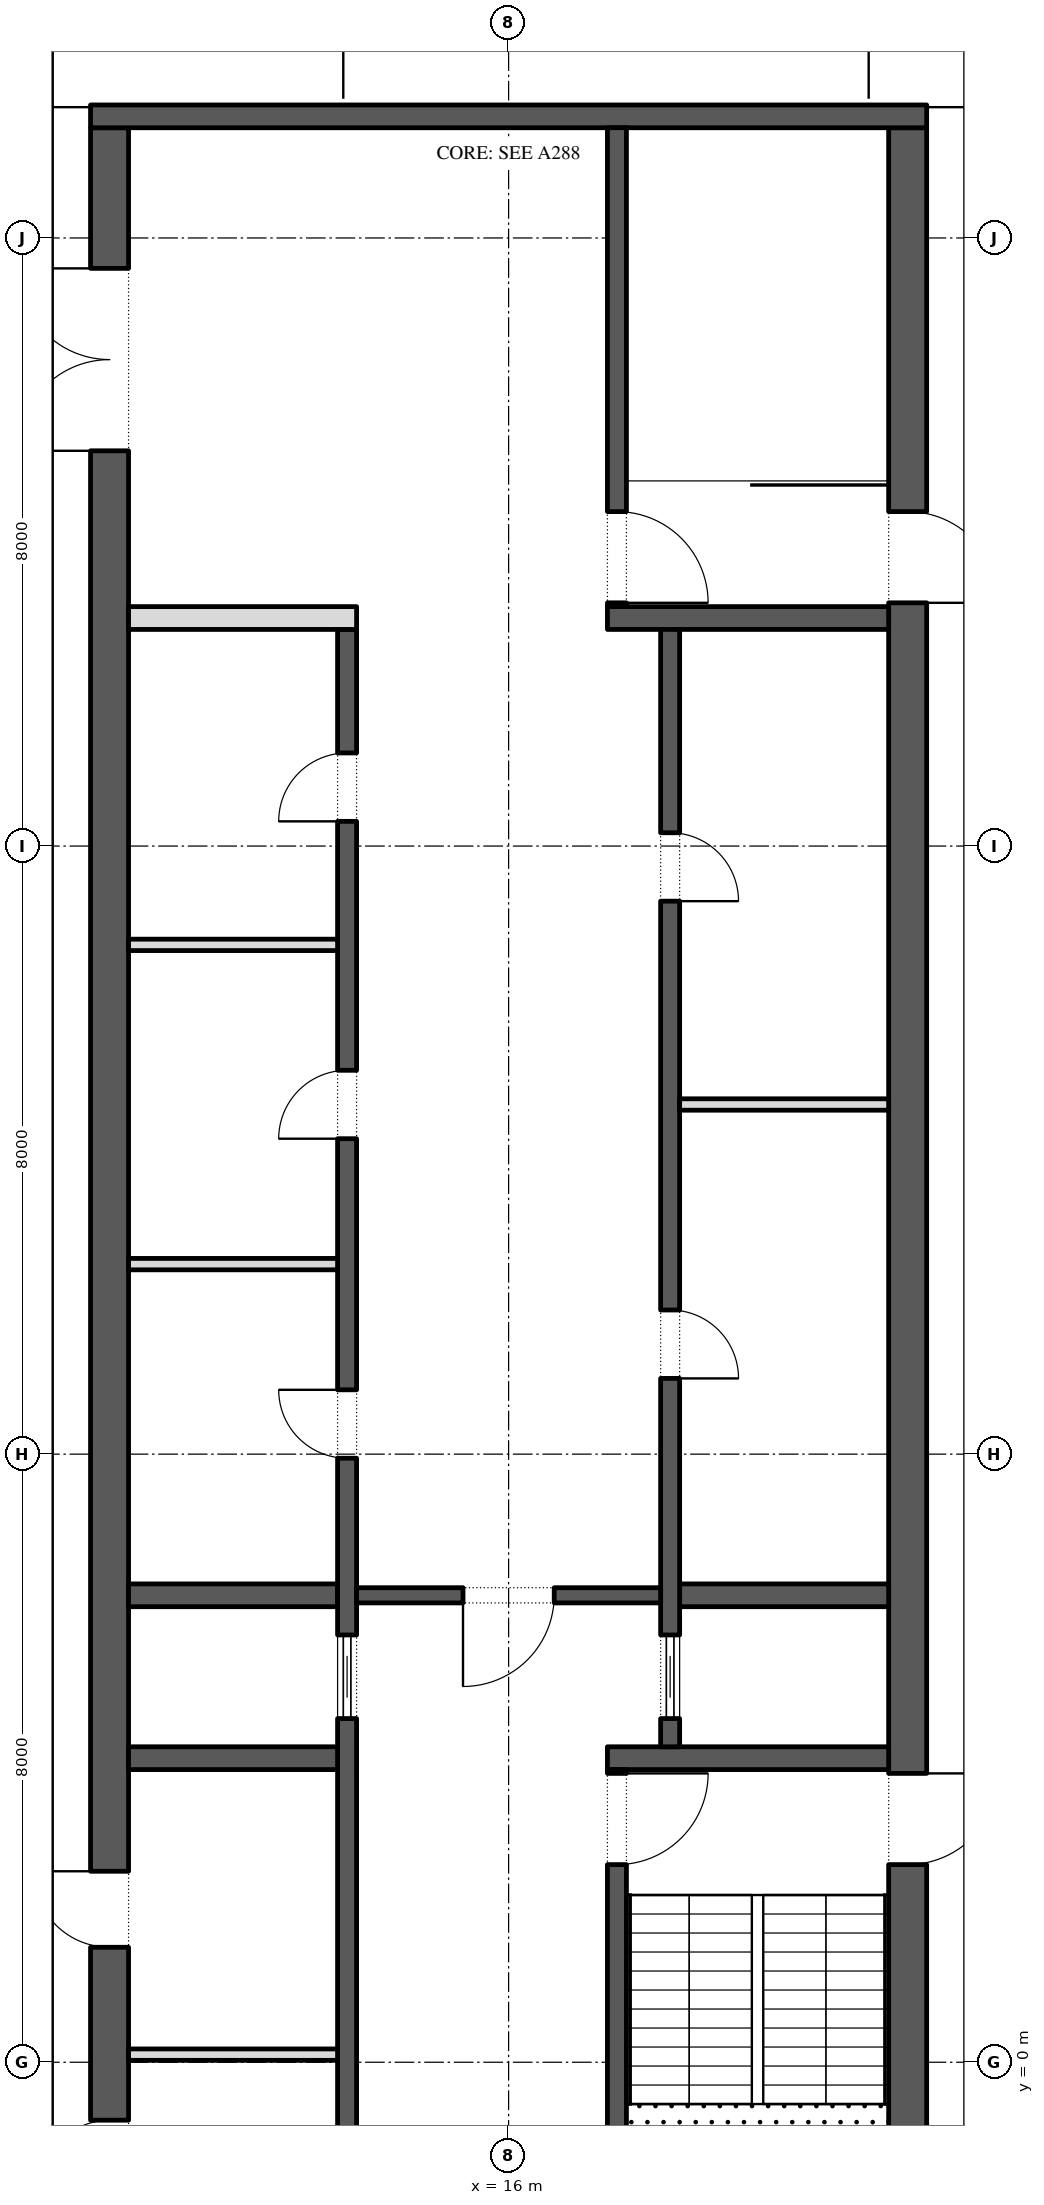
"""IFC4 building model, lengths in metres.
Left out: names, types, materials, properties, quantities, classifications, styles, units other than length and angle.
Written with IfcOpenShell. Run it as: python <this file> out.ifc"""

import sys

from ifc_helpers import new_model, si_unit, direction, frame, frame_2d, origin, place, context, subcontext, project, spatial, rectangle, extrude, element, fill, save


model = new_model("IFC4")
c1 = context("Model", 3, precision=1e-05, world=origin(), true_north=direction((0.0, 1.0)))
c2 = subcontext(c1, "Body", "Model", "MODEL_VIEW")
j1 = project(units=[si_unit("LENGTHUNIT", "METRE"), si_unit("PLANEANGLEUNIT", "RADIAN")], contexts=[c1])
p1 = place(None, origin())
s1 = spatial("IfcSite", under=j1, at=p1, CompositionType="ELEMENT")
p2 = place(p1, origin())
s2 = spatial("IfcBuilding", under=s1, at=p2, CompositionType="ELEMENT")
p3 = place(p2, frame((0.0, 0.0, 385.8)))
s3 = spatial("IfcBuildingStorey", under=s2, at=p3, CompositionType="ELEMENT", Elevation=385.8)
p4 = place(p3, frame((21.25, -2.45, 0.0), z_axis=(0.0, 0.0, 1.0), x_axis=(0.0, 1.0, 0.0)))
e1 = element("IfcWall", 1, at=p4, inside=s3, PredefinedType="SHEAR", context=c2, shape_type="SweptSolid", body=[
    extrude(rectangle(XDim=27.9, YDim=0.5, at=frame_2d((13.95, 0.0))), origin(), (0.0, 0.0, 1.0), 4.0),
])
p5 = place(p4, frame((5.05, 0.0, 0.0)))
e2 = element("IfcOpeningElement", 2, at=p5, cuts=e1, PredefinedType="OPENING", context=c2, shape_type="SweptSolid", body=[
    extrude(rectangle(XDim=1.2, YDim=2.1, at=frame_2d((0.6, 1.05))), frame((0.0, 0.26, 0.0), z_axis=(0.0, -1.0, 0.0), x_axis=(1.0, 0.0, 0.0)), (0.0, 0.0, 1.0), 0.52),
])
p6 = place(p4, frame((21.65, 0.0, 0.0)))
e3 = element("IfcOpeningElement", 3, at=p6, cuts=e1, PredefinedType="OPENING", context=c2, shape_type="SweptSolid", body=[
    extrude(rectangle(XDim=1.2, YDim=2.1, at=frame_2d((0.6, 1.05))), frame((0.0, 0.26, 0.0), z_axis=(0.0, -1.0, 0.0), x_axis=(1.0, 0.0, 0.0)), (0.0, 0.0, 1.0), 0.52),
])
p7 = place(p3, frame((10.75, -2.45, 0.0), z_axis=(0.0, 0.0, 1.0), x_axis=(0.0, 1.0, 0.0)))
e4 = element("IfcWall", 4, at=p7, inside=s3, PredefinedType="SHEAR", context=c2, shape_type="SweptSolid", body=[
    extrude(rectangle(XDim=27.9, YDim=0.5, at=frame_2d((13.95, 0.0))), origin(), (0.0, 0.0, 1.0), 4.0),
])
p8 = place(p7, frame((23.65, 0.0, 0.0)))
e5 = element("IfcOpeningElement", 5, at=p8, cuts=e4, PredefinedType="OPENING", context=c2, shape_type="SweptSolid", body=[
    extrude(rectangle(XDim=2.4, YDim=2.1, at=frame_2d((1.2, 1.05))), frame((0.0, 0.26, 0.0), z_axis=(0.0, -1.0, 0.0), x_axis=(1.0, 0.0, 0.0)), (0.0, 0.0, 1.0), 0.52),
])
p9 = place(p7, frame((0.788, 0.0, 0.0)))
e6 = element("IfcOpeningElement", 6, at=p9, cuts=e4, PredefinedType="OPENING", context=c2, shape_type="SweptSolid", body=[
    extrude(rectangle(XDim=0.9, YDim=2.1, at=frame_2d((0.45, 1.05))), frame((0.0, 0.26, 0.0), z_axis=(0.0, -1.0, 0.0), x_axis=(1.0, 0.0, 0.0)), (0.0, 0.0, 1.0), 0.52),
])
p10 = place(p7, frame((3.962, 0.0, 0.0)))
e7 = element("IfcOpeningElement", 7, at=p10, cuts=e4, PredefinedType="OPENING", context=c2, shape_type="SweptSolid", body=[
    extrude(rectangle(XDim=1.0, YDim=2.1, at=frame_2d((0.5, 1.05))), frame((0.0, 0.26, 0.0), z_axis=(0.0, -1.0, 0.0), x_axis=(1.0, 0.0, 0.0)), (0.0, 0.0, 1.0), 0.52),
])
p11 = place(p3, frame((10.5, 25.6, 0.0), z_axis=(0.0, 0.0, 1.0), x_axis=(1.0, 0.0, 0.0)))
e8 = element("IfcWall", 8, at=p11, inside=s3, PredefinedType="SHEAR", context=c2, shape_type="SweptSolid", body=[
    extrude(rectangle(XDim=11.0, YDim=0.3, at=frame_2d((5.5, 0.0))), origin(), (0.0, 0.0, 1.0), 4.0),
])
p12 = place(p3, frame((17.3, 4.0, 0.0), z_axis=(0.0, 0.0, 1.0), x_axis=(1.0, 0.0, 0.0)))
e9 = element("IfcWall", 9, at=p12, inside=s3, PredefinedType="SHEAR", context=c2, shape_type="SweptSolid", body=[
    extrude(rectangle(XDim=3.7, YDim=0.3, at=frame_2d((1.85, 0.0))), origin(), (0.0, 0.0, 1.0), 4.0),
])
p13 = place(p3, frame((17.425, -2.45, 0.0), z_axis=(0.0, 0.0, 1.0), x_axis=(0.0, 1.0, 0.0)))
e10 = element("IfcWall", 10, at=p13, inside=s3, PredefinedType="SHEAR", context=c2, shape_type="SweptSolid", body=[
    extrude(rectangle(XDim=6.3, YDim=0.25, at=frame_2d((3.15, 0.0))), origin(), (0.0, 0.0, 1.0), 4.0),
])
p14 = place(p13, frame((5.05, 0.0, 0.0)))
e11 = element("IfcOpeningElement", 11, at=p14, cuts=e10, PredefinedType="OPENING", context=c2, shape_type="SweptSolid", body=[
    extrude(rectangle(XDim=1.2, YDim=2.1, at=frame_2d((0.6, 1.05))), frame((0.0, 0.135, 0.0), z_axis=(0.0, -1.0, 0.0), x_axis=(1.0, 0.0, 0.0)), (0.0, 0.0, 1.0), 0.27),
])
p15 = place(p3, frame((17.3, 19.0, 0.0), z_axis=(0.0, 0.0, 1.0), x_axis=(1.0, 0.0, 0.0)))
e12 = element("IfcWall", 12, at=p15, inside=s3, PredefinedType="SHEAR", context=c2, shape_type="SweptSolid", body=[
    extrude(rectangle(XDim=3.7, YDim=0.3, at=frame_2d((1.85, 0.0))), origin(), (0.0, 0.0, 1.0), 4.0),
])
p16 = place(p3, frame((17.425, 19.15, 0.0), z_axis=(0.0, 0.0, 1.0), x_axis=(0.0, 1.0, 0.0)))
e13 = element("IfcWall", 13, at=p16, inside=s3, PredefinedType="SHEAR", context=c2, shape_type="SweptSolid", body=[
    extrude(rectangle(XDim=6.3, YDim=0.25, at=frame_2d((3.15, 0.0))), origin(), (0.0, 0.0, 1.0), 4.0),
])
p17 = place(p16, frame((0.05, 0.0, 0.0)))
e14 = element("IfcOpeningElement", 14, at=p17, cuts=e13, PredefinedType="OPENING", context=c2, shape_type="SweptSolid", body=[
    extrude(rectangle(XDim=1.2, YDim=2.1, at=frame_2d((0.6, 1.05))), frame((0.0, 0.135, 0.0), z_axis=(0.0, -1.0, 0.0), x_axis=(1.0, 0.0, 0.0)), (0.0, 0.0, 1.0), 0.27),
])
p18 = place(p3, frame((18.25, 6.143, 0.0), z_axis=(0.0, 0.0, 1.0), x_axis=(1.0, 0.0, 0.0)))
e15 = element("IfcWall", 15, at=p18, inside=s3, PredefinedType="SHEAR", context=c2, shape_type="SweptSolid", body=[
    extrude(rectangle(XDim=2.75, YDim=0.3, at=frame_2d((1.375, 0.0))), origin(), (0.0, 0.0, 1.0), 4.0),
])
p19 = place(p3, frame((18.125, 4.15, 0.0), z_axis=(0.0, 0.0, 1.0), x_axis=(0.0, 1.0, 0.0)))
e16 = element("IfcWall", 16, at=p19, inside=s3, PredefinedType="SHEAR", context=c2, shape_type="SweptSolid", body=[
    extrude(rectangle(XDim=14.7, YDim=0.25, at=frame_2d((7.35, 0.0))), origin(), (0.0, 0.0, 1.0), 4.0),
])
p20 = place(p19, frame((4.846, 0.0, 0.0)))
e17 = element("IfcOpeningElement", 17, at=p20, cuts=e16, PredefinedType="OPENING", context=c2, shape_type="SweptSolid", body=[
    extrude(rectangle(XDim=0.9, YDim=2.1, at=frame_2d((0.45, 1.05))), frame((0.0, 0.135, 0.0), z_axis=(0.0, -1.0, 0.0), x_axis=(1.0, 0.0, 0.0)), (0.0, 0.0, 1.0), 0.27),
])
p21 = place(p19, frame((11.125, 0.0, 0.0)))
e18 = element("IfcOpeningElement", 18, at=p21, cuts=e16, PredefinedType="OPENING", context=c2, shape_type="SweptSolid", body=[
    extrude(rectangle(XDim=0.9, YDim=2.1, at=frame_2d((0.45, 1.05))), frame((0.0, 0.135, 0.0), z_axis=(0.0, -1.0, 0.0), x_axis=(1.0, 0.0, 0.0)), (0.0, 0.0, 1.0), 0.27),
])
p22 = place(p19, frame((0.371, 0.0, 0.0)))
e19 = element("IfcOpeningElement", 19, at=p22, cuts=e16, PredefinedType="OPENING", context=c2, shape_type="SweptSolid", body=[
    extrude(rectangle(XDim=1.1, YDim=2.1, at=frame_2d((0.55, 1.05))), frame((0.0, 0.135, 0.0), z_axis=(0.0, -1.0, 0.0), x_axis=(1.0, 0.0, 0.0)), (0.0, 0.0, 1.0), 0.27),
])
p23 = place(p3, frame((18.25, 12.6, 0.0), z_axis=(0.0, 0.0, 1.0), x_axis=(1.0, 0.0, 0.0)))
e20 = element("IfcWall", 20, at=p23, inside=s3, PredefinedType="PARTITIONING", context=c2, shape_type="SweptSolid", body=[
    extrude(rectangle(XDim=2.75, YDim=0.15, at=frame_2d((1.375, 0.0))), origin(), (0.0, 0.0, 1.0), 4.0),
])
p24 = place(p3, frame((11.0, 4.0, 0.0), z_axis=(0.0, 0.0, 1.0), x_axis=(1.0, 0.0, 0.0)))
e21 = element("IfcWall", 21, at=p24, inside=s3, PredefinedType="SHEAR", context=c2, shape_type="SweptSolid", body=[
    extrude(rectangle(XDim=3.0, YDim=0.3, at=frame_2d((1.5, 0.0))), origin(), (0.0, 0.0, 1.0), 4.0),
])
p25 = place(p3, frame((11.0, 6.143, 0.0), z_axis=(0.0, 0.0, 1.0), x_axis=(1.0, 0.0, 0.0)))
e22 = element("IfcWall", 22, at=p25, inside=s3, PredefinedType="SHEAR", context=c2, shape_type="SweptSolid", body=[
    extrude(rectangle(XDim=2.75, YDim=0.3, at=frame_2d((1.375, 0.0))), origin(), (0.0, 0.0, 1.0), 4.0),
])
p26 = place(p3, frame((13.875, -2.45, 0.0), z_axis=(0.0, 0.0, 1.0), x_axis=(0.0, 1.0, 0.0)))
e23 = element("IfcWall", 23, at=p26, inside=s3, PredefinedType="SHEAR", context=c2, shape_type="SweptSolid", body=[
    extrude(rectangle(XDim=21.3, YDim=0.25, at=frame_2d((10.65, 0.0))), origin(), (0.0, 0.0, 1.0), 4.0),
])
p27 = place(p26, frame((10.396, 0.0, 0.0)))
e24 = element("IfcOpeningElement", 24, at=p27, cuts=e23, PredefinedType="OPENING", context=c2, shape_type="SweptSolid", body=[
    extrude(rectangle(XDim=0.9, YDim=2.1, at=frame_2d((0.45, 1.05))), frame((0.0, 0.135, 0.0), z_axis=(0.0, -1.0, 0.0), x_axis=(1.0, 0.0, 0.0)), (0.0, 0.0, 1.0), 0.27),
])
p28 = place(p26, frame((14.6, 0.0, 0.0)))
e25 = element("IfcOpeningElement", 25, at=p28, cuts=e23, PredefinedType="OPENING", context=c2, shape_type="SweptSolid", body=[
    extrude(rectangle(XDim=0.9, YDim=2.1, at=frame_2d((0.45, 1.05))), frame((0.0, 0.135, 0.0), z_axis=(0.0, -1.0, 0.0), x_axis=(1.0, 0.0, 0.0)), (0.0, 0.0, 1.0), 0.27),
])
p29 = place(p26, frame((18.775, 0.0, 0.0)))
e26 = element("IfcOpeningElement", 26, at=p29, cuts=e23, PredefinedType="OPENING", context=c2, shape_type="SweptSolid", body=[
    extrude(rectangle(XDim=0.9, YDim=2.1, at=frame_2d((0.45, 1.05))), frame((0.0, 0.135, 0.0), z_axis=(0.0, -1.0, 0.0), x_axis=(1.0, 0.0, 0.0)), (0.0, 0.0, 1.0), 0.27),
])
p30 = place(p26, frame((6.971, 0.0, 0.0)))
e27 = element("IfcOpeningElement", 27, at=p30, cuts=e23, PredefinedType="OPENING", context=c2, shape_type="SweptSolid", body=[
    extrude(rectangle(XDim=1.1, YDim=2.1, at=frame_2d((0.55, 1.05))), frame((0.0, 0.135, 0.0), z_axis=(0.0, -1.0, 0.0), x_axis=(1.0, 0.0, 0.0)), (0.0, 0.0, 1.0), 0.27),
])
p31 = place(p3, frame((11.0, 19.0, 0.0), z_axis=(0.0, 0.0, 1.0), x_axis=(1.0, 0.0, 0.0)))
e28 = element("IfcWall", 28, at=p31, inside=s3, PredefinedType="PARTITIONING", context=c2, shape_type="SweptSolid", body=[
    extrude(rectangle(XDim=3.0, YDim=0.3, at=frame_2d((1.5, 0.0))), origin(), (0.0, 0.0, 1.0), 4.0),
])
for number, where, z_axis, x_axis in (
    (29, (11.0, 10.5, 0.0), (0.0, 0.0, 1.0), (1.0, 0.0, 0.0)),
    (30, (11.0, 14.7, 0.0), (0.0, 0.0, 1.0), (1.0, 0.0, 0.0)),
):
    element("IfcWall", number, at=place(p3, frame(where, z_axis=z_axis, x_axis=x_axis)), inside=s3, PredefinedType="PARTITIONING", context=c2, shape_type="SweptSolid", body=[
        extrude(rectangle(XDim=2.75, YDim=0.15, at=frame_2d((1.375, 0.0))), origin(), (0.0, 0.0, 1.0), 4.0),
    ])
p32 = place(p3, frame((14.0, 6.143, 0.0), z_axis=(0.0, 0.0, 1.0), x_axis=(1.0, 0.0, 0.0)))
e31 = element("IfcWall", 31, at=p32, inside=s3, PredefinedType="SHEAR", context=c2, shape_type="SweptSolid", body=[
    extrude(rectangle(XDim=4.0, YDim=0.2, at=frame_2d((2.0, 0.0))), origin(), (0.0, 0.0, 1.0), 4.0),
])
p33 = place(p32, frame((1.4, 0.0, 0.0)))
e32 = element("IfcOpeningElement", 32, at=p33, cuts=e31, PredefinedType="OPENING", context=c2, shape_type="SweptSolid", body=[
    extrude(rectangle(XDim=1.2, YDim=2.1, at=frame_2d((0.6, 1.05))), frame((0.0, 0.11, 0.0), z_axis=(0.0, -1.0, 0.0), x_axis=(1.0, 0.0, 0.0)), (0.0, 0.0, 1.0), 0.22),
])
p34 = place(p3, frame((11.0, 0.1, 0.0), z_axis=(0.0, 0.0, 1.0), x_axis=(1.0, 0.0, 0.0)))
e33 = element("IfcWall", 33, at=p34, inside=s3, PredefinedType="PARTITIONING", context=c2, shape_type="SweptSolid", body=[
    extrude(rectangle(XDim=2.75, YDim=0.15, at=frame_2d((1.375, 0.0))), origin(), (0.0, 0.0, 1.0), 4.0),
])
p35 = place(p20, frame((0.9, -0.2, 0.0), z_axis=(0.0, 0.0, 1.0), x_axis=(-1.0, 0.0, 0.0)))
e34 = element("IfcDoor", 34, at=p35, inside=s3, OperationType="SINGLE_SWING_LEFT", PredefinedType="DOOR", context=c2, shape_type="SweptSolid", body=[
    extrude(rectangle(XDim=0.9, YDim=2.1, at=frame_2d((0.45, 1.05))), frame((0.0, -0.075, 0.0), z_axis=(0.0, -1.0, 0.0), x_axis=(1.0, 0.0, 0.0)), (0.0, 0.0, 1.0), 0.05),
])
fill(e17, e34)
p36 = place(p21, frame((0.9, -0.2, 0.0), z_axis=(0.0, 0.0, 1.0), x_axis=(-1.0, 0.0, 0.0)))
e35 = element("IfcDoor", 35, at=p36, inside=s3, OperationType="SINGLE_SWING_LEFT", PredefinedType="DOOR", context=c2, shape_type="SweptSolid", body=[
    extrude(rectangle(XDim=0.9, YDim=2.1, at=frame_2d((0.45, 1.05))), frame((0.0, -0.075, 0.0), z_axis=(0.0, -1.0, 0.0), x_axis=(1.0, 0.0, 0.0)), (0.0, 0.0, 1.0), 0.05),
])
fill(e18, e35)
p37 = place(p22, origin())
e36 = element("IfcDoor", 36, at=p37, inside=s3, OperationType="SLIDING_TO_LEFT", PredefinedType="DOOR", context=c2, shape_type="SweptSolid", body=[
    extrude(rectangle(XDim=1.1, YDim=2.1, at=frame_2d((0.55, 1.05))), frame((0.0, 0.025, 0.0), z_axis=(0.0, -1.0, 0.0), x_axis=(1.0, 0.0, 0.0)), (0.0, 0.0, 1.0), 0.05),
])
fill(e19, e36)
p38 = place(p27, origin())
e37 = element("IfcDoor", 37, at=p38, inside=s3, OperationType="SINGLE_SWING_LEFT", PredefinedType="DOOR", context=c2, shape_type="SweptSolid", body=[
    extrude(rectangle(XDim=0.9, YDim=2.1, at=frame_2d((0.45, 1.05))), frame((0.0, 0.125, 0.0), z_axis=(0.0, -1.0, 0.0), x_axis=(1.0, 0.0, 0.0)), (0.0, 0.0, 1.0), 0.05),
])
fill(e24, e37)
p39 = place(p28, origin())
e38 = element("IfcDoor", 38, at=p39, inside=s3, OperationType="SINGLE_SWING_RIGHT", PredefinedType="DOOR", context=c2, shape_type="SweptSolid", body=[
    extrude(rectangle(XDim=0.9, YDim=2.1, at=frame_2d((0.45, 1.05))), frame((0.0, 0.125, 0.0), z_axis=(0.0, -1.0, 0.0), x_axis=(1.0, 0.0, 0.0)), (0.0, 0.0, 1.0), 0.05),
])
fill(e25, e38)
p40 = place(p29, origin())
e39 = element("IfcDoor", 39, at=p40, inside=s3, OperationType="SINGLE_SWING_RIGHT", PredefinedType="DOOR", context=c2, shape_type="SweptSolid", body=[
    extrude(rectangle(XDim=0.9, YDim=2.1, at=frame_2d((0.45, 1.05))), frame((0.0, 0.125, 0.0), z_axis=(0.0, -1.0, 0.0), x_axis=(1.0, 0.0, 0.0)), (0.0, 0.0, 1.0), 0.05),
])
fill(e26, e39)
p41 = place(p30, origin())
e40 = element("IfcDoor", 40, at=p41, inside=s3, OperationType="SLIDING_TO_LEFT", PredefinedType="DOOR", context=c2, shape_type="SweptSolid", body=[
    extrude(rectangle(XDim=1.1, YDim=2.1, at=frame_2d((0.55, 1.05))), frame((0.0, 0.025, 0.0), z_axis=(0.0, -1.0, 0.0), x_axis=(1.0, 0.0, 0.0)), (0.0, 0.0, 1.0), 0.05),
])
fill(e27, e40)
p42 = place(p33, frame((1.2, 0.0, 0.0), z_axis=(0.0, 0.0, 1.0), x_axis=(-1.0, 0.0, 0.0)))
e41 = element("IfcDoor", 41, at=p42, inside=s3, OperationType="SINGLE_SWING_LEFT", PredefinedType="DOOR", context=c2, shape_type="SweptSolid", body=[
    extrude(rectangle(XDim=1.2, YDim=2.1, at=frame_2d((0.6, 1.05))), frame((0.0, 0.025, 0.0), z_axis=(0.0, -1.0, 0.0), x_axis=(1.0, 0.0, 0.0)), (0.0, 0.0, 1.0), 0.05),
])
fill(e32, e41)
p43 = place(p8, origin())
e42 = element("IfcDoor", 42, at=p43, inside=s3, OperationType="DOUBLE_DOOR_SINGLE_SWING", PredefinedType="DOOR", context=c2, shape_type="SweptSolid", body=[
    extrude(rectangle(XDim=2.4, YDim=2.1, at=frame_2d((1.2, 1.05))), frame((0.0, 0.025, 0.0), z_axis=(0.0, -1.0, 0.0), x_axis=(1.0, 0.0, 0.0)), (0.0, 0.0, 1.0), 0.05),
])
fill(e5, e42)
p44 = place(p14, frame((1.2, 0.0, 0.0), z_axis=(0.0, 0.0, 1.0), x_axis=(-1.0, 0.0, 0.0)))
e43 = element("IfcDoor", 43, at=p44, inside=s3, OperationType="SINGLE_SWING_RIGHT", PredefinedType="DOOR", context=c2, shape_type="SweptSolid", body=[
    extrude(rectangle(XDim=1.2, YDim=2.1, at=frame_2d((0.6, 1.05))), frame((0.0, 0.025, 0.0), z_axis=(0.0, -1.0, 0.0), x_axis=(1.0, 0.0, 0.0)), (0.0, 0.0, 1.0), 0.05),
])
fill(e11, e43)
p45 = place(p5, frame((1.2, 0.0, 0.0), z_axis=(0.0, 0.0, 1.0), x_axis=(-1.0, 0.0, 0.0)))
e44 = element("IfcDoor", 44, at=p45, inside=s3, OperationType="SINGLE_SWING_RIGHT", PredefinedType="DOOR", context=c2, shape_type="SweptSolid", body=[
    extrude(rectangle(XDim=1.2, YDim=2.1, at=frame_2d((0.6, 1.05))), frame((0.0, 0.025, 0.0), z_axis=(0.0, -1.0, 0.0), x_axis=(1.0, 0.0, 0.0)), (0.0, 0.0, 1.0), 0.05),
])
fill(e2, e44)
p46 = place(p17, frame((1.2, 0.0, 0.0), z_axis=(0.0, 0.0, 1.0), x_axis=(-1.0, 0.0, 0.0)))
e45 = element("IfcDoor", 45, at=p46, inside=s3, OperationType="SINGLE_SWING_LEFT", PredefinedType="DOOR", context=c2, shape_type="SweptSolid", body=[
    extrude(rectangle(XDim=1.2, YDim=2.1, at=frame_2d((0.6, 1.05))), frame((0.0, 0.025, 0.0), z_axis=(0.0, -1.0, 0.0), x_axis=(1.0, 0.0, 0.0)), (0.0, 0.0, 1.0), 0.05),
])
fill(e14, e45)
p47 = place(p6, frame((1.2, 0.0, 0.0), z_axis=(0.0, 0.0, 1.0), x_axis=(-1.0, 0.0, 0.0)))
e46 = element("IfcDoor", 46, at=p47, inside=s3, OperationType="SINGLE_SWING_LEFT", PredefinedType="DOOR", context=c2, shape_type="SweptSolid", body=[
    extrude(rectangle(XDim=1.2, YDim=2.1, at=frame_2d((0.6, 1.05))), frame((0.0, 0.025, 0.0), z_axis=(0.0, -1.0, 0.0), x_axis=(1.0, 0.0, 0.0)), (0.0, 0.0, 1.0), 0.05),
])
fill(e3, e46)
p48 = place(p9, origin())
e47 = element("IfcDoor", 47, at=p48, inside=s3, OperationType="SINGLE_SWING_RIGHT", PredefinedType="DOOR", context=c2, shape_type="SweptSolid", body=[
    extrude(rectangle(XDim=0.9, YDim=2.1, at=frame_2d((0.45, 1.05))), frame((0.0, -0.2, 0.0), z_axis=(0.0, -1.0, 0.0), x_axis=(1.0, 0.0, 0.0)), (0.0, 0.0, 1.0), 0.05),
])
fill(e6, e47)
p49 = place(p10, origin())
e48 = element("IfcDoor", 48, at=p49, inside=s3, OperationType="SINGLE_SWING_LEFT", PredefinedType="DOOR", context=c2, shape_type="SweptSolid", body=[
    extrude(rectangle(XDim=1.0, YDim=2.1, at=frame_2d((0.5, 1.05))), frame((0.0, -0.2, 0.0), z_axis=(0.0, -1.0, 0.0), x_axis=(1.0, 0.0, 0.0)), (0.0, 0.0, 1.0), 0.05),
])
fill(e7, e48)
save(model, sys.argv[1])
